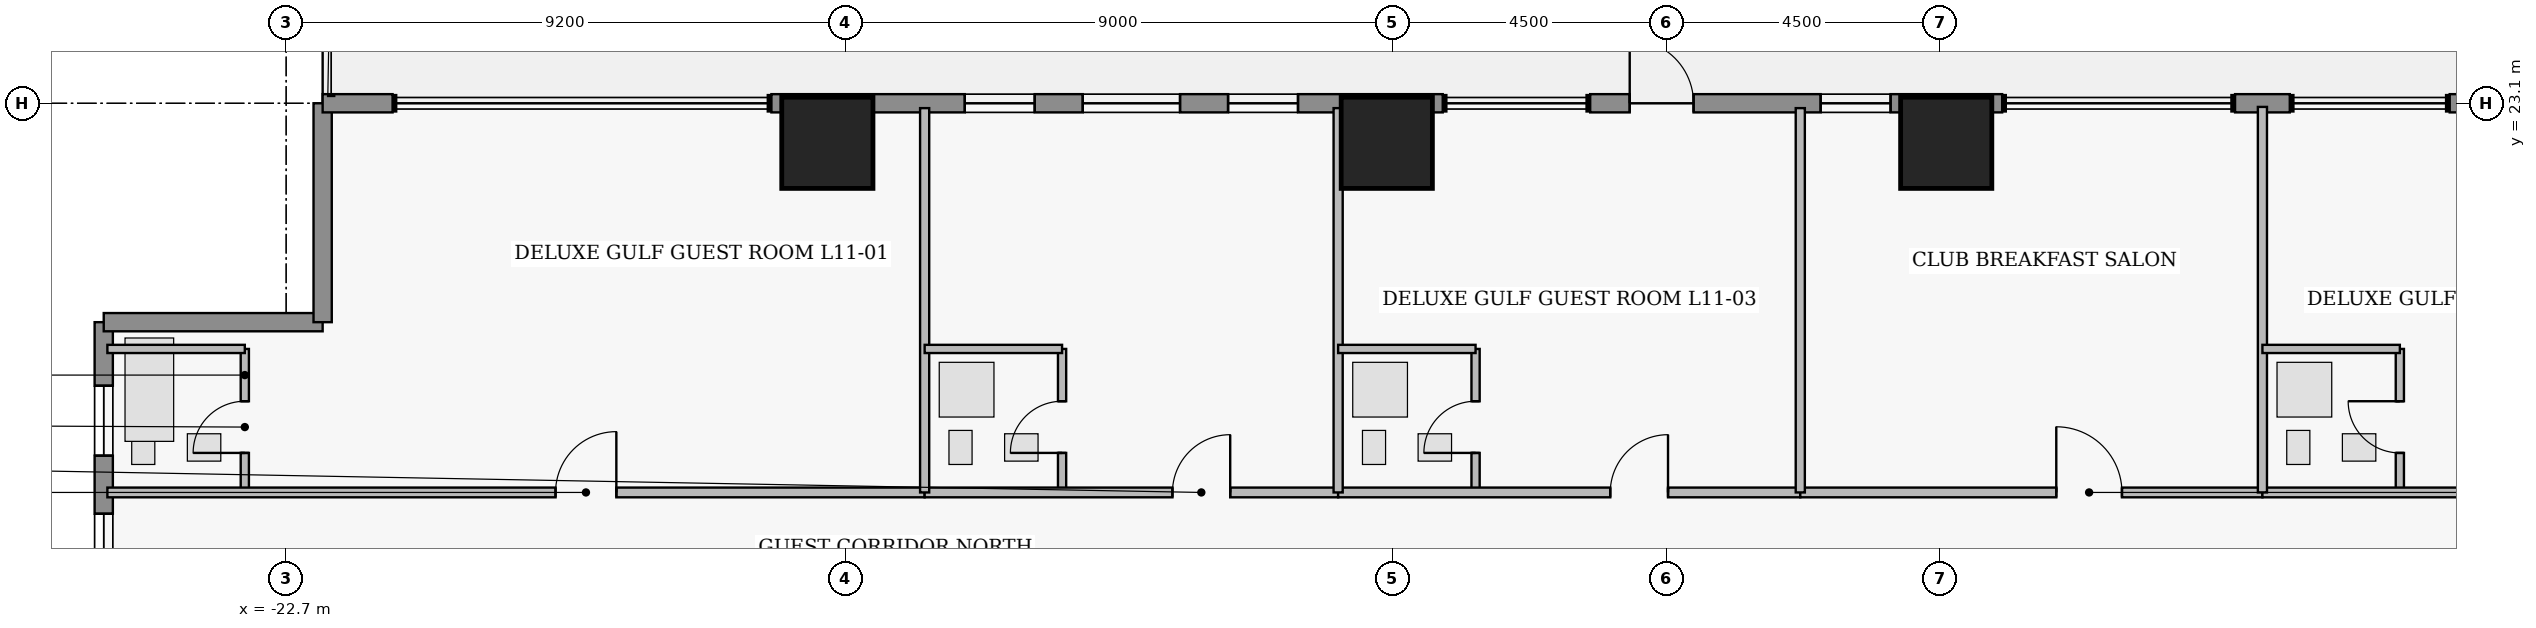
"""IFC4 building model, lengths in metres.
Left out: names, types, materials, properties, quantities, classifications, styles, units other than length and angle.
Written with IfcOpenShell. Run it as: python <this file> out.ifc"""

import sys

from ifc_helpers import new_model, si_unit, direction, frame, frame_2d, origin, origin_2d, place, context, subcontext, project, spatial, rectangle, extrude, element, fill, save


model = new_model("IFC4")
c1 = context("Model", 3, precision=1e-05, world=origin(), true_north=direction((0.0, 1.0)))
c2 = subcontext(c1, "Body", "Model", "MODEL_VIEW")
j1 = project(units=[si_unit("LENGTHUNIT", "METRE"), si_unit("PLANEANGLEUNIT", "RADIAN")], contexts=[c1])
p1 = place(None, origin())
s1 = spatial("IfcSite", under=j1, at=p1, CompositionType="ELEMENT")
p2 = place(p1, origin())
s2 = spatial("IfcBuilding", under=s1, at=p2, CompositionType="ELEMENT")
p3 = place(p2, frame((0.0, 0.0, 49.5)))
s3 = spatial("IfcBuildingStorey", under=s2, at=p3, CompositionType="ELEMENT", Elevation=49.5)
for number, where, z_axis, x_axis in (
    (1, (-13.8, 22.45, 0.0), (0.0, 0.0, 1.0), (1.0, 0.0, 0.0)),
    (2, (-4.6, 22.45, 0.0), (0.0, 0.0, 1.0), (1.0, 0.0, 0.0)),
    (3, (4.6, 22.45, 0.0), (0.0, 0.0, 1.0), (1.0, 0.0, 0.0)),
):
    element("IfcColumn", number, at=place(p3, frame(where, z_axis=z_axis, x_axis=x_axis)), inside=s3, PredefinedType="COLUMN", context=c2, shape_type="SweptSolid", body=[
        extrude(rectangle(XDim=1.5, YDim=1.5, at=origin_2d()), origin(), (0.0, 0.0, 1.0), 3.65),
    ])
p4 = place(p3, frame((-25.7, 14.4, 0.0), z_axis=(0.0, 0.0, 1.0), x_axis=(0.0, 1.0, 0.0)))
e4 = element("IfcWall", 4, at=p4, inside=s3, PredefinedType="STANDARD", context=c2, shape_type="SweptSolid", body=[
    extrude(rectangle(XDim=5.1, YDim=0.3, at=frame_2d((2.55, 0.0))), origin(), (0.0, 0.0, 1.0), 3.43),
])
p5 = place(p4, frame((0.8, 0.0, 0.95)))
e5 = element("IfcOpeningElement", 5, at=p5, cuts=e4, PredefinedType="OPENING", context=c2, shape_type="SweptSolid", body=[
    extrude(rectangle(XDim=1.15, YDim=1.55, at=frame_2d((0.575, 0.775))), frame((0.0, 0.16, 0.0), z_axis=(0.0, -1.0, 0.0), x_axis=(1.0, 0.0, 0.0)), (0.0, 0.0, 1.0), 0.32),
])
p6 = place(p4, frame((2.905, 0.0, 0.95)))
e6 = element("IfcOpeningElement", 6, at=p6, cuts=e4, PredefinedType="OPENING", context=c2, shape_type="SweptSolid", body=[
    extrude(rectangle(XDim=1.15, YDim=1.55, at=frame_2d((0.575, 0.775))), frame((0.0, 0.16, 0.0), z_axis=(0.0, -1.0, 0.0), x_axis=(1.0, 0.0, 0.0)), (0.0, 0.0, 1.0), 0.32),
])
p7 = place(p3, frame((-25.7, 19.5, 0.0), z_axis=(0.0, 0.0, 1.0), x_axis=(1.0, 0.0, 0.0)))
e7 = element("IfcWall", 7, at=p7, inside=s3, PredefinedType="STANDARD", context=c2, shape_type="SweptSolid", body=[
    extrude(rectangle(XDim=3.6, YDim=0.3, at=frame_2d((1.8, 0.0))), origin(), (0.0, 0.0, 1.0), 3.43),
])
p8 = place(p3, frame((-22.1, 19.5, 0.0), z_axis=(0.0, 0.0, 1.0), x_axis=(0.0, 1.0, 0.0)))
e8 = element("IfcWall", 8, at=p8, inside=s3, PredefinedType="STANDARD", context=c2, shape_type="SweptSolid", body=[
    extrude(rectangle(XDim=3.6, YDim=0.3, at=frame_2d((1.8, 0.0))), origin(), (0.0, 0.0, 1.0), 3.43),
])
p9 = place(p3, frame((-22.1, 23.1, 0.0), z_axis=(0.0, 0.0, 1.0), x_axis=(1.0, 0.0, 0.0)))
e9 = element("IfcWall", 9, at=p9, inside=s3, PredefinedType="STANDARD", context=c2, shape_type="SweptSolid", body=[
    extrude(rectangle(XDim=1.15, YDim=0.3, at=frame_2d((0.575, 0.0))), origin(), (0.0, 0.0, 1.0), 3.43),
])
p10 = place(p3, frame((-14.72, 23.1, 0.0), z_axis=(0.0, 0.0, 1.0), x_axis=(1.0, 0.0, 0.0)))
e10 = element("IfcWall", 10, at=p10, inside=s3, PredefinedType="STANDARD", context=c2, shape_type="SweptSolid", body=[
    extrude(rectangle(XDim=11.04, YDim=0.3, at=frame_2d((5.52, 0.0))), origin(), (0.0, 0.0, 1.0), 3.43),
])
p11 = place(p10, frame((5.12, 0.0, 0.85)))
e11 = element("IfcOpeningElement", 11, at=p11, cuts=e10, PredefinedType="OPENING", context=c2, shape_type="SweptSolid", body=[
    extrude(rectangle(XDim=1.6, YDim=1.8, at=frame_2d((0.8, 0.9))), frame((0.0, 0.16, 0.0), z_axis=(0.0, -1.0, 0.0), x_axis=(1.0, 0.0, 0.0)), (0.0, 0.0, 1.0), 0.32),
])
p12 = place(p10, frame((3.18, 0.0, 0.95)))
e12 = element("IfcOpeningElement", 12, at=p12, cuts=e10, PredefinedType="OPENING", context=c2, shape_type="SweptSolid", body=[
    extrude(rectangle(XDim=1.15, YDim=1.55, at=frame_2d((0.575, 0.775))), frame((0.0, 0.16, 0.0), z_axis=(0.0, -1.0, 0.0), x_axis=(1.0, 0.0, 0.0)), (0.0, 0.0, 1.0), 0.32),
])
p13 = place(p10, frame((7.51, 0.0, 0.95)))
e13 = element("IfcOpeningElement", 13, at=p13, cuts=e10, PredefinedType="OPENING", context=c2, shape_type="SweptSolid", body=[
    extrude(rectangle(XDim=1.15, YDim=1.55, at=frame_2d((0.575, 0.775))), frame((0.0, 0.16, 0.0), z_axis=(0.0, -1.0, 0.0), x_axis=(1.0, 0.0, 0.0)), (0.0, 0.0, 1.0), 0.32),
])
p14 = place(p3, frame((-1.255, 23.1, 0.0), z_axis=(0.0, 0.0, 1.0), x_axis=(1.0, 0.0, 0.0)))
e14 = element("IfcWall", 14, at=p14, inside=s3, PredefinedType="STANDARD", context=c2, shape_type="SweptSolid", body=[
    extrude(rectangle(XDim=6.775, YDim=0.3, at=frame_2d((3.387, 0.0))), origin(), (0.0, 0.0, 1.0), 3.43),
])
p15 = place(p14, frame((0.65, 0.0, 0.0)))
e15 = element("IfcOpeningElement", 15, at=p15, cuts=e14, PredefinedType="OPENING", context=c2, shape_type="SweptSolid", body=[
    extrude(rectangle(XDim=1.05, YDim=2.2, at=frame_2d((0.525, 1.1))), frame((0.0, 0.16, 0.0), z_axis=(0.0, -1.0, 0.0), x_axis=(1.0, 0.0, 0.0)), (0.0, 0.0, 1.0), 0.32),
])
p16 = place(p14, frame((3.79, 0.0, 0.95)))
e16 = element("IfcOpeningElement", 16, at=p16, cuts=e14, PredefinedType="OPENING", context=c2, shape_type="SweptSolid", body=[
    extrude(rectangle(XDim=1.15, YDim=1.55, at=frame_2d((0.575, 0.775))), frame((0.0, 0.16, 0.0), z_axis=(0.0, -1.0, 0.0), x_axis=(1.0, 0.0, 0.0)), (0.0, 0.0, 1.0), 0.32),
])
p17 = place(p3, frame((9.35, 23.1, 0.0), z_axis=(0.0, 0.0, 1.0), x_axis=(1.0, 0.0, 0.0)))
e17 = element("IfcWall", 17, at=p17, inside=s3, PredefinedType="STANDARD", context=c2, shape_type="SweptSolid", body=[
    extrude(rectangle(XDim=0.9, YDim=0.3, at=frame_2d((0.45, 0.0))), origin(), (0.0, 0.0, 1.0), 3.43),
])
p18 = place(p3, frame((12.88, 23.1, 0.0), z_axis=(0.0, 0.0, 1.0), x_axis=(1.0, 0.0, 0.0)))
e18 = element("IfcWall", 18, at=p18, inside=s3, PredefinedType="STANDARD", context=c2, shape_type="SweptSolid", body=[
    extrude(rectangle(XDim=1.84, YDim=0.3, at=frame_2d((0.92, 0.0))), origin(), (0.0, 0.0, 1.0), 3.43),
])
p19 = place(p3, frame((-23.38, 16.7, 0.0), z_axis=(0.0, 0.0, 1.0), x_axis=(0.0, 1.0, 0.0)))
e19 = element("IfcWall", 19, at=p19, inside=s3, PredefinedType="PLUMBINGWALL", context=c2, shape_type="SweptSolid", body=[
    extrude(rectangle(XDim=2.36, YDim=0.135, at=frame_2d((1.18, 0.0))), origin(), (0.0, 0.0, 1.0), 3.43),
])
p20 = place(p19, frame((0.65, 0.0, 0.0)))
e20 = element("IfcOpeningElement", 20, at=p20, cuts=e19, PredefinedType="OPENING", context=c2, shape_type="SweptSolid", body=[
    extrude(rectangle(XDim=0.85, YDim=2.1, at=frame_2d((0.425, 1.05))), frame((0.0, 0.077, 0.0), z_axis=(0.0, -1.0, 0.0), x_axis=(1.0, 0.0, 0.0)), (0.0, 0.0, 1.0), 0.155),
])
p21 = place(p3, frame((-25.64, 16.7, 0.0), z_axis=(0.0, 0.0, 1.0), x_axis=(1.0, 0.0, 0.0)))
e21 = element("IfcWall", 21, at=p21, inside=s3, PredefinedType="PARTITIONING", context=c2, shape_type="SweptSolid", body=[
    extrude(rectangle(XDim=13.44, YDim=0.16, at=frame_2d((6.72, 0.0))), origin(), (0.0, 0.0, 1.0), 2.973),
])
p22 = place(p21, frame((7.37, 0.0, 0.0)))
e22 = element("IfcOpeningElement", 22, at=p22, cuts=e21, PredefinedType="OPENING", context=c2, shape_type="SweptSolid", body=[
    extrude(rectangle(XDim=1.0, YDim=2.15, at=frame_2d((0.5, 1.075))), frame((0.0, 0.09, 0.0), z_axis=(0.0, -1.0, 0.0), x_axis=(1.0, 0.0, 0.0)), (0.0, 0.0, 1.0), 0.18),
])
p23 = place(p3, frame((-9.94, 16.7, 0.0), z_axis=(0.0, 0.0, 1.0), x_axis=(0.0, 1.0, 0.0)))
e23 = element("IfcWall", 23, at=p23, inside=s3, PredefinedType="PLUMBINGWALL", context=c2, shape_type="SweptSolid", body=[
    extrude(rectangle(XDim=2.36, YDim=0.135, at=frame_2d((1.18, 0.0))), origin(), (0.0, 0.0, 1.0), 3.43),
])
p24 = place(p23, frame((0.65, 0.0, 0.0)))
e24 = element("IfcOpeningElement", 24, at=p24, cuts=e23, PredefinedType="OPENING", context=c2, shape_type="SweptSolid", body=[
    extrude(rectangle(XDim=0.85, YDim=2.1, at=frame_2d((0.425, 1.05))), frame((0.0, 0.077, 0.0), z_axis=(0.0, -1.0, 0.0), x_axis=(1.0, 0.0, 0.0)), (0.0, 0.0, 1.0), 0.155),
])
p25 = place(p3, frame((-12.2, 16.7, 0.0), z_axis=(0.0, 0.0, 1.0), x_axis=(1.0, 0.0, 0.0)))
e25 = element("IfcWall", 25, at=p25, inside=s3, PredefinedType="PARTITIONING", context=c2, shape_type="SweptSolid", body=[
    extrude(rectangle(XDim=6.8, YDim=0.16, at=frame_2d((3.4, 0.0))), origin(), (0.0, 0.0, 1.0), 2.973),
])
p26 = place(p25, frame((4.075, 0.0, 0.0)))
e26 = element("IfcOpeningElement", 26, at=p26, cuts=e25, PredefinedType="OPENING", context=c2, shape_type="SweptSolid", body=[
    extrude(rectangle(XDim=0.95, YDim=2.15, at=frame_2d((0.475, 1.075))), frame((0.0, 0.09, 0.0), z_axis=(0.0, -1.0, 0.0), x_axis=(1.0, 0.0, 0.0)), (0.0, 0.0, 1.0), 0.18),
])
p27 = place(p3, frame((-3.14, 16.7, 0.0), z_axis=(0.0, 0.0, 1.0), x_axis=(0.0, 1.0, 0.0)))
e27 = element("IfcWall", 27, at=p27, inside=s3, PredefinedType="PLUMBINGWALL", context=c2, shape_type="SweptSolid", body=[
    extrude(rectangle(XDim=2.36, YDim=0.135, at=frame_2d((1.18, 0.0))), origin(), (0.0, 0.0, 1.0), 3.43),
])
p28 = place(p27, frame((0.65, 0.0, 0.0)))
e28 = element("IfcOpeningElement", 28, at=p28, cuts=e27, PredefinedType="OPENING", context=c2, shape_type="SweptSolid", body=[
    extrude(rectangle(XDim=0.85, YDim=2.1, at=frame_2d((0.425, 1.05))), frame((0.0, 0.077, 0.0), z_axis=(0.0, -1.0, 0.0), x_axis=(1.0, 0.0, 0.0)), (0.0, 0.0, 1.0), 0.155),
])
p29 = place(p3, frame((-5.4, 16.7, 0.0), z_axis=(0.0, 0.0, 1.0), x_axis=(1.0, 0.0, 0.0)))
e29 = element("IfcWall", 29, at=p29, inside=s3, PredefinedType="PARTITIONING", context=c2, shape_type="SweptSolid", body=[
    extrude(rectangle(XDim=7.6, YDim=0.16, at=frame_2d((3.8, 0.0))), origin(), (0.0, 0.0, 1.0), 2.973),
])
p30 = place(p29, frame((4.475, 0.0, 0.0)))
e30 = element("IfcOpeningElement", 30, at=p30, cuts=e29, PredefinedType="OPENING", context=c2, shape_type="SweptSolid", body=[
    extrude(rectangle(XDim=0.95, YDim=2.15, at=frame_2d((0.475, 1.075))), frame((0.0, 0.09, 0.0), z_axis=(0.0, -1.0, 0.0), x_axis=(1.0, 0.0, 0.0)), (0.0, 0.0, 1.0), 0.18),
])
p31 = place(p3, frame((2.2, 16.7, 0.0), z_axis=(0.0, 0.0, 1.0), x_axis=(1.0, 0.0, 0.0)))
e31 = element("IfcWall", 31, at=p31, inside=s3, PredefinedType="PARTITIONING", context=c2, shape_type="SweptSolid", body=[
    extrude(rectangle(XDim=7.6, YDim=0.16, at=frame_2d((3.8, 0.0))), origin(), (0.0, 0.0, 1.0), 2.973),
])
p32 = place(p31, frame((4.21, 0.0, 0.0)))
e32 = element("IfcOpeningElement", 32, at=p32, cuts=e31, PredefinedType="OPENING", context=c2, shape_type="SweptSolid", body=[
    extrude(rectangle(XDim=1.08, YDim=2.18, at=frame_2d((0.54, 1.09))), frame((0.0, 0.09, 0.0), z_axis=(0.0, -1.0, 0.0), x_axis=(1.0, 0.0, 0.0)), (0.0, 0.0, 1.0), 0.18),
])
p33 = place(p3, frame((12.06, 16.7, 0.0), z_axis=(0.0, 0.0, 1.0), x_axis=(0.0, 1.0, 0.0)))
e33 = element("IfcWall", 33, at=p33, inside=s3, PredefinedType="PLUMBINGWALL", context=c2, shape_type="SweptSolid", body=[
    extrude(rectangle(XDim=2.36, YDim=0.135, at=frame_2d((1.18, 0.0))), origin(), (0.0, 0.0, 1.0), 3.43),
])
p34 = place(p33, frame((0.65, 0.0, 0.0)))
e34 = element("IfcOpeningElement", 34, at=p34, cuts=e33, PredefinedType="OPENING", context=c2, shape_type="SweptSolid", body=[
    extrude(rectangle(XDim=0.85, YDim=2.1, at=frame_2d((0.425, 1.05))), frame((0.0, 0.077, 0.0), z_axis=(0.0, -1.0, 0.0), x_axis=(1.0, 0.0, 0.0)), (0.0, 0.0, 1.0), 0.155),
])
p35 = place(p3, frame((9.8, 16.7, 0.0), z_axis=(0.0, 0.0, 1.0), x_axis=(1.0, 0.0, 0.0)))
e35 = element("IfcWall", 35, at=p35, inside=s3, PredefinedType="PARTITIONING", context=c2, shape_type="SweptSolid", body=[
    extrude(rectangle(XDim=7.84, YDim=0.16, at=frame_2d((3.92, 0.0))), origin(), (0.0, 0.0, 1.0), 2.973),
])
p36 = place(p35, frame((4.57, 0.0, 0.0)))
e36 = element("IfcOpeningElement", 36, at=p36, cuts=e35, PredefinedType="OPENING", context=c2, shape_type="SweptSolid", body=[
    extrude(rectangle(XDim=1.0, YDim=2.15, at=frame_2d((0.5, 1.075))), frame((0.0, 0.09, 0.0), z_axis=(0.0, -1.0, 0.0), x_axis=(1.0, 0.0, 0.0)), (0.0, 0.0, 1.0), 0.18),
])
p37 = place(p3, frame((-25.64, 19.06, 0.0), z_axis=(0.0, 0.0, 1.0), x_axis=(1.0, 0.0, 0.0)))
e37 = element("IfcWall", 37, at=p37, inside=s3, PredefinedType="PLUMBINGWALL", context=c2, shape_type="SweptSolid", body=[
    extrude(rectangle(XDim=2.26, YDim=0.135, at=frame_2d((1.13, 0.0))), origin(), (0.0, 0.0, 1.0), 3.43),
])
p38 = place(p3, frame((-12.2, 16.7, 0.0), z_axis=(0.0, 0.0, 1.0), x_axis=(0.0, 1.0, 0.0)))
e38 = element("IfcWall", 38, at=p38, inside=s3, PredefinedType="PARTITIONING", context=c2, shape_type="SweptSolid", body=[
    extrude(rectangle(XDim=6.32, YDim=0.15, at=frame_2d((3.16, 0.0))), origin(), (0.0, 0.0, 1.0), 3.43),
])
p39 = place(p3, frame((-12.2, 19.06, 0.0), z_axis=(0.0, 0.0, 1.0), x_axis=(1.0, 0.0, 0.0)))
e39 = element("IfcWall", 39, at=p39, inside=s3, PredefinedType="PLUMBINGWALL", context=c2, shape_type="SweptSolid", body=[
    extrude(rectangle(XDim=2.26, YDim=0.135, at=frame_2d((1.13, 0.0))), origin(), (0.0, 0.0, 1.0), 2.973),
])
p40 = place(p3, frame((-5.4, 16.7, 0.0), z_axis=(0.0, 0.0, 1.0), x_axis=(0.0, 1.0, 0.0)))
e40 = element("IfcWall", 40, at=p40, inside=s3, PredefinedType="PARTITIONING", context=c2, shape_type="SweptSolid", body=[
    extrude(rectangle(XDim=6.32, YDim=0.15, at=frame_2d((3.16, 0.0))), origin(), (0.0, 0.0, 1.0), 3.43),
])
p41 = place(p3, frame((-5.4, 19.06, 0.0), z_axis=(0.0, 0.0, 1.0), x_axis=(1.0, 0.0, 0.0)))
e41 = element("IfcWall", 41, at=p41, inside=s3, PredefinedType="PLUMBINGWALL", context=c2, shape_type="SweptSolid", body=[
    extrude(rectangle(XDim=2.26, YDim=0.135, at=frame_2d((1.13, 0.0))), origin(), (0.0, 0.0, 1.0), 2.973),
])
p42 = place(p3, frame((2.2, 16.7, 0.0), z_axis=(0.0, 0.0, 1.0), x_axis=(0.0, 1.0, 0.0)))
e42 = element("IfcWall", 42, at=p42, inside=s3, PredefinedType="PARTITIONING", context=c2, shape_type="SweptSolid", body=[
    extrude(rectangle(XDim=6.32, YDim=0.15, at=frame_2d((3.16, 0.0))), origin(), (0.0, 0.0, 1.0), 3.43),
])
p43 = place(p3, frame((9.8, 16.7, 0.0), z_axis=(0.0, 0.0, 1.0), x_axis=(0.0, 1.0, 0.0)))
e43 = element("IfcWall", 43, at=p43, inside=s3, PredefinedType="PARTITIONING", context=c2, shape_type="SweptSolid", body=[
    extrude(rectangle(XDim=6.34, YDim=0.15, at=frame_2d((3.17, 0.0))), origin(), (0.0, 0.0, 1.0), 3.43),
])
p44 = place(p3, frame((9.8, 19.06, 0.0), z_axis=(0.0, 0.0, 1.0), x_axis=(1.0, 0.0, 0.0)))
e44 = element("IfcWall", 44, at=p44, inside=s3, PredefinedType="PLUMBINGWALL", context=c2, shape_type="SweptSolid", body=[
    extrude(rectangle(XDim=2.26, YDim=0.135, at=frame_2d((1.13, 0.0))), origin(), (0.0, 0.0, 1.0), 2.973),
])
p45 = place(p5, origin())
e45 = element("IfcWindow", 45, at=p45, inside=s3, PartitioningType="SINGLE_PANEL", PredefinedType="WINDOW", context=c2, shape_type="SweptSolid", body=[
    extrude(rectangle(XDim=1.15, YDim=1.55, at=frame_2d((0.575, 0.775))), frame((0.0, 0.03, 0.0), z_axis=(0.0, -1.0, 0.0), x_axis=(1.0, 0.0, 0.0)), (0.0, 0.0, 1.0), 0.06),
])
fill(e5, e45)
p46 = place(p6, origin())
e46 = element("IfcWindow", 46, at=p46, inside=s3, PartitioningType="SINGLE_PANEL", PredefinedType="WINDOW", context=c2, shape_type="SweptSolid", body=[
    extrude(rectangle(XDim=1.15, YDim=1.55, at=frame_2d((0.575, 0.775))), frame((0.0, 0.03, 0.0), z_axis=(0.0, -1.0, 0.0), x_axis=(1.0, 0.0, 0.0)), (0.0, 0.0, 1.0), 0.06),
])
fill(e6, e46)
p47 = place(p11, origin())
e47 = element("IfcWindow", 47, at=p47, inside=s3, PartitioningType="SINGLE_PANEL", PredefinedType="WINDOW", context=c2, shape_type="SweptSolid", body=[
    extrude(rectangle(XDim=1.6, YDim=1.8, at=frame_2d((0.8, 0.9))), frame((0.0, 0.03, 0.0), z_axis=(0.0, -1.0, 0.0), x_axis=(1.0, 0.0, 0.0)), (0.0, 0.0, 1.0), 0.06),
])
fill(e11, e47)
p48 = place(p12, origin())
e48 = element("IfcWindow", 48, at=p48, inside=s3, PartitioningType="SINGLE_PANEL", PredefinedType="WINDOW", context=c2, shape_type="SweptSolid", body=[
    extrude(rectangle(XDim=1.15, YDim=1.55, at=frame_2d((0.575, 0.775))), frame((0.0, 0.03, 0.0), z_axis=(0.0, -1.0, 0.0), x_axis=(1.0, 0.0, 0.0)), (0.0, 0.0, 1.0), 0.06),
])
fill(e12, e48)
p49 = place(p13, origin())
e49 = element("IfcWindow", 49, at=p49, inside=s3, PartitioningType="SINGLE_PANEL", PredefinedType="WINDOW", context=c2, shape_type="SweptSolid", body=[
    extrude(rectangle(XDim=1.15, YDim=1.55, at=frame_2d((0.575, 0.775))), frame((0.0, 0.03, 0.0), z_axis=(0.0, -1.0, 0.0), x_axis=(1.0, 0.0, 0.0)), (0.0, 0.0, 1.0), 0.06),
])
fill(e13, e49)
p50 = place(p15, origin())
e50 = element("IfcDoor", 50, at=p50, inside=s3, OperationType="SINGLE_SWING_LEFT", PredefinedType="DOOR", context=c2, shape_type="SweptSolid", body=[
    extrude(rectangle(XDim=1.05, YDim=2.2, at=frame_2d((0.525, 1.1))), frame((0.0, 0.025, 0.0), z_axis=(0.0, -1.0, 0.0), x_axis=(1.0, 0.0, 0.0)), (0.0, 0.0, 1.0), 0.05),
])
fill(e15, e50)
p51 = place(p16, origin())
e51 = element("IfcWindow", 51, at=p51, inside=s3, PartitioningType="SINGLE_PANEL", PredefinedType="WINDOW", context=c2, shape_type="SweptSolid", body=[
    extrude(rectangle(XDim=1.15, YDim=1.55, at=frame_2d((0.575, 0.775))), frame((0.0, 0.03, 0.0), z_axis=(0.0, -1.0, 0.0), x_axis=(1.0, 0.0, 0.0)), (0.0, 0.0, 1.0), 0.06),
])
fill(e16, e51)
p52 = place(p20, origin())
e52 = element("IfcDoor", 52, at=p52, inside=s3, OperationType="SINGLE_SWING_LEFT", PredefinedType="DOOR", context=c2, shape_type="SweptSolid", body=[
    extrude(rectangle(XDim=0.85, YDim=2.1, at=frame_2d((0.425, 1.05))), frame((0.0, 0.025, 0.0), z_axis=(0.0, -1.0, 0.0), x_axis=(1.0, 0.0, 0.0)), (0.0, 0.0, 1.0), 0.05),
])
fill(e20, e52)
p53 = place(p22, origin())
e53 = element("IfcDoor", 53, at=p53, inside=s3, OperationType="SINGLE_SWING_RIGHT", PredefinedType="DOOR", context=c2, shape_type="SweptSolid", body=[
    extrude(rectangle(XDim=1.0, YDim=2.15, at=frame_2d((0.5, 1.075))), frame((0.0, 0.025, 0.0), z_axis=(0.0, -1.0, 0.0), x_axis=(1.0, 0.0, 0.0)), (0.0, 0.0, 1.0), 0.05),
])
fill(e22, e53)
p54 = place(p24, origin())
e54 = element("IfcDoor", 54, at=p54, inside=s3, OperationType="SINGLE_SWING_LEFT", PredefinedType="DOOR", context=c2, shape_type="SweptSolid", body=[
    extrude(rectangle(XDim=0.85, YDim=2.1, at=frame_2d((0.425, 1.05))), frame((0.0, 0.025, 0.0), z_axis=(0.0, -1.0, 0.0), x_axis=(1.0, 0.0, 0.0)), (0.0, 0.0, 1.0), 0.05),
])
fill(e24, e54)
p55 = place(p26, origin())
e55 = element("IfcDoor", 55, at=p55, inside=s3, OperationType="SINGLE_SWING_RIGHT", PredefinedType="DOOR", context=c2, shape_type="SweptSolid", body=[
    extrude(rectangle(XDim=0.95, YDim=2.15, at=frame_2d((0.475, 1.075))), frame((0.0, 0.025, 0.0), z_axis=(0.0, -1.0, 0.0), x_axis=(1.0, 0.0, 0.0)), (0.0, 0.0, 1.0), 0.05),
])
fill(e26, e55)
p56 = place(p28, origin())
e56 = element("IfcDoor", 56, at=p56, inside=s3, OperationType="SINGLE_SWING_LEFT", PredefinedType="DOOR", context=c2, shape_type="SweptSolid", body=[
    extrude(rectangle(XDim=0.85, YDim=2.1, at=frame_2d((0.425, 1.05))), frame((0.0, 0.025, 0.0), z_axis=(0.0, -1.0, 0.0), x_axis=(1.0, 0.0, 0.0)), (0.0, 0.0, 1.0), 0.05),
])
fill(e28, e56)
p57 = place(p30, origin())
e57 = element("IfcDoor", 57, at=p57, inside=s3, OperationType="SINGLE_SWING_RIGHT", PredefinedType="DOOR", context=c2, shape_type="SweptSolid", body=[
    extrude(rectangle(XDim=0.95, YDim=2.15, at=frame_2d((0.475, 1.075))), frame((0.0, 0.025, 0.0), z_axis=(0.0, -1.0, 0.0), x_axis=(1.0, 0.0, 0.0)), (0.0, 0.0, 1.0), 0.05),
])
fill(e30, e57)
p58 = place(p32, origin())
e58 = element("IfcDoor", 58, at=p58, inside=s3, OperationType="SINGLE_SWING_LEFT", PredefinedType="DOOR", context=c2, shape_type="SweptSolid", body=[
    extrude(rectangle(XDim=1.08, YDim=2.18, at=frame_2d((0.54, 1.09))), frame((0.0, 0.025, 0.0), z_axis=(0.0, -1.0, 0.0), x_axis=(1.0, 0.0, 0.0)), (0.0, 0.0, 1.0), 0.05),
])
fill(e32, e58)
p59 = place(p34, origin())
e59 = element("IfcDoor", 59, at=p59, inside=s3, OperationType="SINGLE_SWING_RIGHT", PredefinedType="DOOR", context=c2, shape_type="SweptSolid", body=[
    extrude(rectangle(XDim=0.85, YDim=2.1, at=frame_2d((0.425, 1.05))), frame((0.0, 0.025, 0.0), z_axis=(0.0, -1.0, 0.0), x_axis=(1.0, 0.0, 0.0)), (0.0, 0.0, 1.0), 0.05),
])
fill(e34, e59)
save(model, sys.argv[1])
